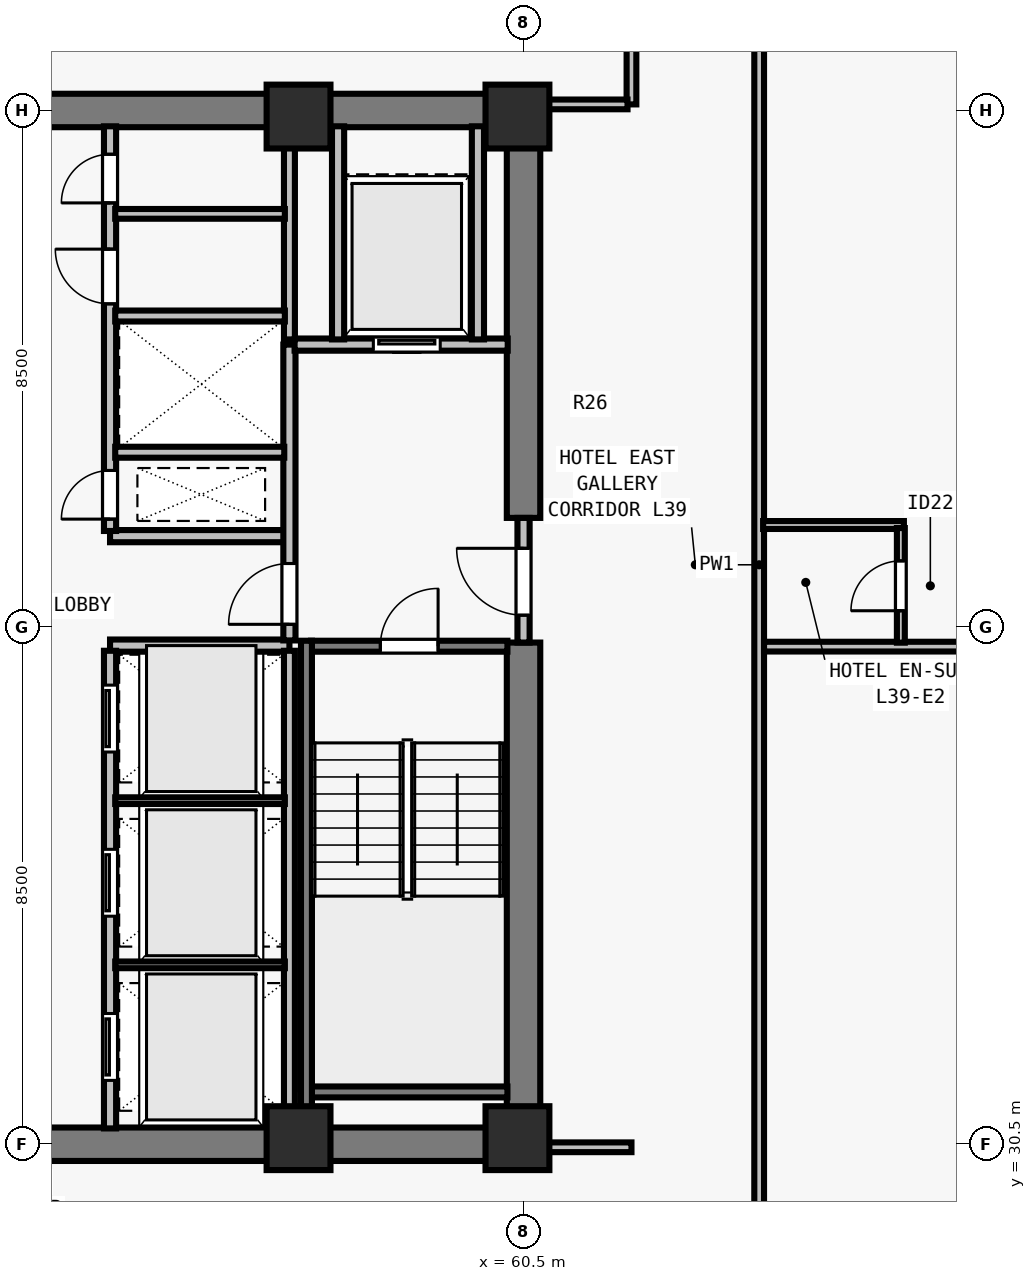
"""IFC4 building model, lengths in metres.
Left out: names, types, materials, properties, quantities, classifications, styles, units other than length and angle.
Written with IfcOpenShell. Run it as: python <this file> out.ifc"""

import sys

from ifc_helpers import new_model, si_unit, direction, frame, frame_2d, origin, origin_2d, place, context, subcontext, project, spatial, rectangle, extrude, element, fill, save


model = new_model("IFC4")
c1 = context("Model", 3, precision=1e-05, world=origin(), true_north=direction((0.0, 1.0)))
c2 = subcontext(c1, "Body", "Model", "MODEL_VIEW")
j1 = project(units=[si_unit("LENGTHUNIT", "METRE"), si_unit("PLANEANGLEUNIT", "RADIAN")], contexts=[c1])
p1 = place(None, origin())
s1 = spatial("IfcSite", under=j1, at=p1, CompositionType="ELEMENT")
p2 = place(p1, origin())
s2 = spatial("IfcBuilding", under=s1, at=p2, CompositionType="ELEMENT")
p3 = place(p2, frame((0.0, 0.0, 144.5)))
s3 = spatial("IfcBuildingStorey", under=s2, at=p3, CompositionType="ELEMENT", Elevation=144.5)
for number, where, z_axis, x_axis in (
    (1, (56.8, 30.6, 0.0), (0.0, 0.0, 1.0), (1.0, 0.0, 0.0)),
    (2, (60.4, 30.6, 0.0), (0.0, 0.0, 1.0), (1.0, 0.0, 0.0)),
    (3, (56.8, 47.4, 0.0), (0.0, 0.0, 1.0), (1.0, 0.0, 0.0)),
    (4, (60.4, 47.4, 0.0), (0.0, 0.0, 1.0), (1.0, 0.0, 0.0)),
):
    element("IfcColumn", number, at=place(p3, frame(where, z_axis=z_axis, x_axis=x_axis)), inside=s3, PredefinedType="COLUMN", context=c2, shape_type="SweptSolid", body=[
        extrude(rectangle(XDim=1.05, YDim=1.05, at=origin_2d()), origin(), (0.0, 0.0, 1.0), 3.5),
    ])
for number, where, z_axis, x_axis in (
    (5, (43.225, 30.5, 0.0), (0.0, 0.0, 1.0), (1.0, 0.0, 0.0)),
    (6, (43.225, 47.5, 0.0), (0.0, 0.0, 1.0), (1.0, 0.0, 0.0)),
):
    element("IfcWall", number, at=place(p3, frame(where, z_axis=z_axis, x_axis=x_axis)), inside=s3, PredefinedType="SHEAR", context=c2, shape_type="SweptSolid", body=[
        extrude(rectangle(XDim=17.55, YDim=0.55, at=frame_2d((8.775, 0.0))), origin(), (0.0, 0.0, 1.0), 3.28),
    ])
p4 = place(p3, frame((60.5, 30.765, 0.0), z_axis=(0.0, 0.0, 1.0), x_axis=(0.0, 1.0, 0.0)))
e7 = element("IfcWall", 7, at=p4, inside=s3, PredefinedType="SHEAR", context=c2, shape_type="SweptSolid", body=[
    extrude(rectangle(XDim=7.985, YDim=0.55, at=frame_2d((3.993, 0.0))), origin(), (0.0, 0.0, 1.0), 3.28),
])
p5 = place(p3, frame((60.5, 40.8, 0.0), z_axis=(0.0, 0.0, 1.0), x_axis=(0.0, 1.0, 0.0)))
e8 = element("IfcWall", 8, at=p5, inside=s3, PredefinedType="SHEAR", context=c2, shape_type="SweptSolid", body=[
    extrude(rectangle(XDim=6.435, YDim=0.55, at=frame_2d((3.218, 0.0))), origin(), (0.0, 0.0, 1.0), 3.28),
])
for number, where, z_axis, x_axis in (
    (9, (53.7, 38.7, 0.0), (0.0, 0.0, 1.0), (1.0, 0.0, 0.0)),
    (10, (53.7, 40.5, 0.0), (0.0, 0.0, 1.0), (1.0, 0.0, 0.0)),
):
    element("IfcWall", number, at=place(p3, frame(where, z_axis=z_axis, x_axis=x_axis)), inside=s3, PredefinedType="SOLIDWALL", context=c2, shape_type="SweptSolid", body=[
        extrude(rectangle(XDim=2.95, YDim=0.2, at=frame_2d((1.475, 0.0))), origin(), (0.0, 0.0, 1.0), 3.28),
    ])
p6 = place(p3, frame((53.7, 30.76, 0.0), z_axis=(0.0, 0.0, 1.0), x_axis=(0.0, 1.0, 0.0)))
e11 = element("IfcWall", 11, at=p6, inside=s3, PredefinedType="SOLIDWALL", context=c2, shape_type="SweptSolid", body=[
    extrude(rectangle(XDim=7.855, YDim=0.2, at=frame_2d((3.927, 0.0))), origin(), (0.0, 0.0, 1.0), 3.28),
])
p7 = place(p6, frame((0.79, 0.0, 0.0)))
e12 = element("IfcOpeningElement", 12, at=p7, cuts=e11, PredefinedType="OPENING", context=c2, shape_type="SweptSolid", body=[
    extrude(rectangle(XDim=1.1, YDim=2.2, at=frame_2d((0.55, 1.1))), frame((0.0, 0.11, 0.0), z_axis=(0.0, -1.0, 0.0), x_axis=(1.0, 0.0, 0.0)), (0.0, 0.0, 1.0), 0.22),
])
p8 = place(p6, frame((3.49, 0.0, 0.0)))
e13 = element("IfcOpeningElement", 13, at=p8, cuts=e11, PredefinedType="OPENING", context=c2, shape_type="SweptSolid", body=[
    extrude(rectangle(XDim=1.1, YDim=2.2, at=frame_2d((0.55, 1.1))), frame((0.0, 0.11, 0.0), z_axis=(0.0, -1.0, 0.0), x_axis=(1.0, 0.0, 0.0)), (0.0, 0.0, 1.0), 0.22),
])
p9 = place(p6, frame((6.19, 0.0, 0.0)))
e14 = element("IfcOpeningElement", 14, at=p9, cuts=e11, PredefinedType="OPENING", context=c2, shape_type="SweptSolid", body=[
    extrude(rectangle(XDim=1.1, YDim=2.2, at=frame_2d((0.55, 1.1))), frame((0.0, 0.11, 0.0), z_axis=(0.0, -1.0, 0.0), x_axis=(1.0, 0.0, 0.0)), (0.0, 0.0, 1.0), 0.22),
])
p10 = place(p3, frame((53.7, 40.585, 0.0), z_axis=(0.0, 0.0, 1.0), x_axis=(0.0, 1.0, 0.0)))
e15 = element("IfcWall", 15, at=p10, inside=s3, PredefinedType="SOLIDWALL", context=c2, shape_type="SweptSolid", body=[
    extrude(rectangle(XDim=6.655, YDim=0.2, at=frame_2d((3.328, 0.0))), origin(), (0.0, 0.0, 1.0), 3.28),
])
p11 = place(p10, frame((0.195, 0.0, 0.0)))
e16 = element("IfcOpeningElement", 16, at=p11, cuts=e15, PredefinedType="OPENING", context=c2, shape_type="SweptSolid", body=[
    extrude(rectangle(XDim=0.8, YDim=2.08, at=frame_2d((0.4, 1.04))), frame((0.0, 0.11, 0.0), z_axis=(0.0, -1.0, 0.0), x_axis=(1.0, 0.0, 0.0)), (0.0, 0.0, 1.0), 0.22),
])
p12 = place(p10, frame((3.735, 0.0, 0.0)))
e17 = element("IfcOpeningElement", 17, at=p12, cuts=e15, PredefinedType="OPENING", context=c2, shape_type="SweptSolid", body=[
    extrude(rectangle(XDim=0.9, YDim=2.12, at=frame_2d((0.45, 1.06))), frame((0.0, 0.11, 0.0), z_axis=(0.0, -1.0, 0.0), x_axis=(1.0, 0.0, 0.0)), (0.0, 0.0, 1.0), 0.22),
])
p13 = place(p10, frame((5.395, 0.0, 0.0)))
e18 = element("IfcOpeningElement", 18, at=p13, cuts=e15, PredefinedType="OPENING", context=c2, shape_type="SweptSolid", body=[
    extrude(rectangle(XDim=0.8, YDim=2.1, at=frame_2d((0.4, 1.05))), frame((0.0, 0.11, 0.0), z_axis=(0.0, -1.0, 0.0), x_axis=(1.0, 0.0, 0.0)), (0.0, 0.0, 1.0), 0.22),
])
p14 = place(p3, frame((60.5, 38.75, 0.0), z_axis=(0.0, 0.0, 1.0), x_axis=(0.0, 1.0, 0.0)))
e19 = element("IfcWall", 19, at=p14, inside=s3, PredefinedType="SOLIDWALL", context=c2, shape_type="SweptSolid", body=[
    extrude(rectangle(XDim=2.05, YDim=0.2, at=frame_2d((1.025, 0.0))), origin(), (0.0, 0.0, 1.0), 3.28),
])
p15 = place(p14, frame((0.45, 0.0, 0.0)))
e20 = element("IfcOpeningElement", 20, at=p15, cuts=e19, PredefinedType="OPENING", context=c2, shape_type="SweptSolid", body=[
    extrude(rectangle(XDim=1.1, YDim=2.15, at=frame_2d((0.55, 1.075))), frame((0.0, 0.11, 0.0), z_axis=(0.0, -1.0, 0.0), x_axis=(1.0, 0.0, 0.0)), (0.0, 0.0, 1.0), 0.22),
])
p16 = place(p3, frame((56.65, 38.785, 0.0), z_axis=(0.0, 0.0, 1.0), x_axis=(0.0, 1.0, 0.0)))
e21 = element("IfcWall", 21, at=p16, inside=s3, PredefinedType="SOLIDWALL", context=c2, shape_type="SweptSolid", body=[
    extrude(rectangle(XDim=4.865, YDim=0.2, at=frame_2d((2.433, 0.0))), origin(), (0.0, 0.0, 1.0), 3.28),
])
p17 = place(p16, frame((0.265, 0.0, 0.0)))
e22 = element("IfcOpeningElement", 22, at=p17, cuts=e21, PredefinedType="OPENING", context=c2, shape_type="SweptSolid", body=[
    extrude(rectangle(XDim=1.0, YDim=2.15, at=frame_2d((0.5, 1.075))), frame((0.0, 0.11, 0.0), z_axis=(0.0, -1.0, 0.0), x_axis=(1.0, 0.0, 0.0)), (0.0, 0.0, 1.0), 0.22),
])
p18 = place(p3, frame((56.735, 43.65, 0.0), z_axis=(0.0, 0.0, 1.0), x_axis=(1.0, 0.0, 0.0)))
e23 = element("IfcWall", 23, at=p18, inside=s3, PredefinedType="SOLIDWALL", context=c2, shape_type="SweptSolid", body=[
    extrude(rectangle(XDim=3.505, YDim=0.2, at=frame_2d((1.752, 0.0))), origin(), (0.0, 0.0, 1.0), 3.28),
])
p19 = place(p18, frame((1.295, 0.0, 0.0)))
e24 = element("IfcOpeningElement", 24, at=p19, cuts=e23, PredefinedType="OPENING", context=c2, shape_type="SweptSolid", body=[
    extrude(rectangle(XDim=1.1, YDim=2.2, at=frame_2d((0.55, 1.1))), frame((0.0, 0.11, 0.0), z_axis=(0.0, -1.0, 0.0), x_axis=(1.0, 0.0, 0.0)), (0.0, 0.0, 1.0), 0.22),
])
for number, where, z_axis, x_axis in (
    (25, (57.45, 43.735, 0.0), (0.0, 0.0, 1.0), (0.0, 1.0, 0.0)),
    (26, (59.75, 43.735, 0.0), (0.0, 0.0, 1.0), (0.0, 1.0, 0.0)),
):
    element("IfcWall", number, at=place(p3, frame(where, z_axis=z_axis, x_axis=x_axis)), inside=s3, PredefinedType="SOLIDWALL", context=c2, shape_type="SweptSolid", body=[
        extrude(rectangle(XDim=3.505, YDim=0.2, at=frame_2d((1.752, 0.0))), origin(), (0.0, 0.0, 1.0), 3.28),
    ])
p20 = place(p3, frame((56.65, 30.76, 0.0), z_axis=(0.0, 0.0, 1.0), x_axis=(0.0, 1.0, 0.0)))
e27 = element("IfcWall", 27, at=p20, inside=s3, PredefinedType="SOLIDWALL", context=c2, shape_type="SweptSolid", body=[
    extrude(rectangle(XDim=7.855, YDim=0.18, at=frame_2d((3.927, 0.0))), origin(), (0.0, 0.0, 1.0), 3.28),
])
for number, where, z_axis, x_axis in (
    (28, (53.785, 33.45, 0.0), (0.0, 0.0, 1.0), (1.0, 0.0, 0.0)),
    (29, (53.785, 36.15, 0.0), (0.0, 0.0, 1.0), (1.0, 0.0, 0.0)),
):
    element("IfcWall", number, at=place(p3, frame(where, z_axis=z_axis, x_axis=x_axis)), inside=s3, PredefinedType="PARTITIONING", context=c2, shape_type="SweptSolid", body=[
        extrude(rectangle(XDim=2.79, YDim=0.11, at=frame_2d((1.395, 0.0))), origin(), (0.0, 0.0, 1.0), 3.28),
    ])
p21 = place(p3, frame((56.65, 43.735, 0.0), z_axis=(0.0, 0.0, 1.0), x_axis=(0.0, 1.0, 0.0)))
e30 = element("IfcWall", 30, at=p21, inside=s3, PredefinedType="SOLIDWALL", context=c2, shape_type="SweptSolid", body=[
    extrude(rectangle(XDim=3.505, YDim=0.18, at=frame_2d((1.752, 0.0))), origin(), (0.0, 0.0, 1.0), 3.28),
])
p22 = place(p3, frame((53.785, 41.88, 0.0), z_axis=(0.0, 0.0, 1.0), x_axis=(1.0, 0.0, 0.0)))
e31 = element("IfcWall", 31, at=p22, inside=s3, PredefinedType="SOLIDWALL", context=c2, shape_type="SweptSolid", body=[
    extrude(rectangle(XDim=2.78, YDim=0.18, at=frame_2d((1.39, 0.0))), origin(), (0.0, 0.0, 1.0), 3.28),
])
p23 = place(p3, frame((53.785, 44.12, 0.0), z_axis=(0.0, 0.0, 1.0), x_axis=(1.0, 0.0, 0.0)))
e32 = element("IfcWall", 32, at=p23, inside=s3, PredefinedType="SOLIDWALL", context=c2, shape_type="SweptSolid", body=[
    extrude(rectangle(XDim=2.79, YDim=0.18, at=frame_2d((1.395, 0.0))), origin(), (0.0, 0.0, 1.0), 3.28),
])
p24 = place(p3, frame((53.785, 45.8, 0.0), z_axis=(0.0, 0.0, 1.0), x_axis=(1.0, 0.0, 0.0)))
e33 = element("IfcWall", 33, at=p24, inside=s3, PredefinedType="PARTITIONING", context=c2, shape_type="SweptSolid", body=[
    extrude(rectangle(XDim=2.79, YDim=0.16, at=frame_2d((1.395, 0.0))), origin(), (0.0, 0.0, 1.0), 3.28),
])
p25 = place(p3, frame((64.375, 15.325, 0.0), z_axis=(0.0, 0.0, 1.0), x_axis=(0.0, 1.0, 0.0)))
e34 = element("IfcWall", 34, at=p25, inside=s3, PredefinedType="PARTITIONING", context=c2, shape_type="SweptSolid", body=[
    extrude(rectangle(XDim=47.35, YDim=0.16, at=frame_2d((23.675, 0.0))), origin(), (0.0, 0.0, 1.0), 2.555),
])
p26 = place(p25, frame((12.547, 0.0, 0.0)))
e35 = element("IfcOpeningElement", 35, at=p26, cuts=e34, PredefinedType="OPENING", context=c2, shape_type="SweptSolid", body=[
    extrude(rectangle(XDim=0.96, YDim=2.15, at=frame_2d((0.48, 1.075))), frame((0.0, 0.09, 0.0), z_axis=(0.0, -1.0, 0.0), x_axis=(1.0, 0.0, 0.0)), (0.0, 0.0, 1.0), 0.18),
])
p27 = place(p25, frame((35.902, 0.0, 0.0)))
e36 = element("IfcOpeningElement", 36, at=p27, cuts=e34, PredefinedType="OPENING", context=c2, shape_type="SweptSolid", body=[
    extrude(rectangle(XDim=0.96, YDim=2.15, at=frame_2d((0.48, 1.075))), frame((0.0, 0.09, 0.0), z_axis=(0.0, -1.0, 0.0), x_axis=(1.0, 0.0, 0.0)), (0.0, 0.0, 1.0), 0.18),
])
p28 = place(p3, frame((62.275, 47.6, 0.0), z_axis=(0.0, 0.0, 1.0), x_axis=(0.0, 1.0, 0.0)))
e37 = element("IfcWall", 37, at=p28, inside=s3, PredefinedType="PARTITIONING", context=c2, shape_type="SweptSolid", body=[
    extrude(rectangle(XDim=15.075, YDim=0.16, at=frame_2d((7.538, 0.0))), origin(), (0.0, 0.0, 1.0), 2.555),
])
p29 = place(p3, frame((60.765, 30.45, 0.0), z_axis=(0.0, 0.0, 1.0), x_axis=(1.0, 0.0, 0.0)))
e38 = element("IfcWall", 38, at=p29, inside=s3, PredefinedType="PARTITIONING", context=c2, shape_type="SweptSolid", body=[
    extrude(rectangle(XDim=1.51, YDim=0.16, at=frame_2d((0.755, 0.0))), origin(), (0.0, 0.0, 1.0), 3.28),
])
p30 = place(p3, frame((60.765, 47.6, 0.0), z_axis=(0.0, 0.0, 1.0), x_axis=(1.0, 0.0, 0.0)))
e39 = element("IfcWall", 39, at=p30, inside=s3, PredefinedType="PARTITIONING", context=c2, shape_type="SweptSolid", body=[
    extrude(rectangle(XDim=1.445, YDim=0.16, at=frame_2d((0.723, 0.0))), origin(), (0.0, 0.0, 1.0), 3.28),
])
p31 = place(p3, frame((64.455, 38.683, 0.0), z_axis=(0.0, 0.0, 1.0), x_axis=(1.0, 0.0, 0.0)))
e40 = element("IfcWall", 40, at=p31, inside=s3, PredefinedType="PARTITIONING", context=c2, shape_type="SweptSolid", body=[
    extrude(rectangle(XDim=11.22, YDim=0.16, at=frame_2d((5.61, 0.0))), origin(), (0.0, 0.0, 1.0), 3.28),
])
p32 = place(p3, frame((64.44, 40.683, 0.0), z_axis=(0.0, 0.0, 1.0), x_axis=(1.0, 0.0, 0.0)))
e41 = element("IfcWall", 41, at=p32, inside=s3, PredefinedType="PLUMBINGWALL", context=c2, shape_type="SweptSolid", body=[
    extrude(rectangle(XDim=2.315, YDim=0.13, at=frame_2d((1.157, 0.0))), origin(), (0.0, 0.0, 1.0), 3.28),
])
p33 = place(p3, frame((66.705, 38.748, 0.0), z_axis=(0.0, 0.0, 1.0), x_axis=(0.0, 1.0, 0.0)))
e42 = element("IfcWall", 42, at=p33, inside=s3, PredefinedType="PLUMBINGWALL", context=c2, shape_type="SweptSolid", body=[
    extrude(rectangle(XDim=1.885, YDim=0.13, at=frame_2d((0.942, 0.0))), origin(), (0.0, 0.0, 1.0), 3.28),
])
p34 = place(p33, frame((0.525, 0.0, 0.0)))
e43 = element("IfcOpeningElement", 43, at=p34, cuts=e42, PredefinedType="OPENING", context=c2, shape_type="SweptSolid", body=[
    extrude(rectangle(XDim=0.82, YDim=2.1, at=frame_2d((0.41, 1.05))), frame((0.0, 0.075, 0.0), z_axis=(0.0, -1.0, 0.0), x_axis=(1.0, 0.0, 0.0)), (0.0, 0.0, 1.0), 0.15),
])
p35 = place(p3, frame((57.005, 38.69, 0.0), z_axis=(0.0, 0.0, 1.0), x_axis=(1.0, 0.0, 0.0)))
e44 = element("IfcWall", 44, at=p35, inside=s3, PredefinedType="SOLIDWALL", context=c2, shape_type="SweptSolid", body=[
    extrude(rectangle(XDim=3.23, YDim=0.18, at=frame_2d((1.615, 0.0))), origin(), (0.0, 0.0, 1.0), 3.28),
])
p36 = place(p35, frame((1.14, 0.0, 0.0)))
e45 = element("IfcOpeningElement", 45, at=p36, cuts=e44, PredefinedType="OPENING", context=c2, shape_type="SweptSolid", body=[
    extrude(rectangle(XDim=0.95, YDim=2.15, at=frame_2d((0.475, 1.075))), frame((0.0, 0.1, 0.0), z_axis=(0.0, -1.0, 0.0), x_axis=(1.0, 0.0, 0.0)), (0.0, 0.0, 1.0), 0.2),
])
p37 = place(p3, frame((57.005, 31.36, 0.0), z_axis=(0.0, 0.0, 1.0), x_axis=(1.0, 0.0, 0.0)))
e46 = element("IfcWall", 46, at=p37, inside=s3, PredefinedType="SOLIDWALL", context=c2, shape_type="SweptSolid", body=[
    extrude(rectangle(XDim=3.23, YDim=0.18, at=frame_2d((1.615, 0.0))), origin(), (0.0, 0.0, 1.0), 3.28),
])
p38 = place(p3, frame((56.93, 38.78, 0.0), z_axis=(0.0, 0.0, 1.0), x_axis=(0.0, -1.0, 0.0)))
e47 = element("IfcWall", 47, at=p38, inside=s3, PredefinedType="SOLIDWALL", context=c2, shape_type="SweptSolid", body=[
    extrude(rectangle(XDim=8.017, YDim=0.18, at=frame_2d((4.009, 0.0))), origin(), (0.0, 0.0, 1.0), 3.28),
])
p39 = place(p15, origin())
e48 = element("IfcDoor", 48, at=p39, inside=s3, OperationType="SINGLE_SWING_RIGHT", PredefinedType="DOOR", context=c2, shape_type="SweptSolid", body=[
    extrude(rectangle(XDim=1.1, YDim=2.15, at=frame_2d((0.55, 1.075))), frame((0.0, 0.025, 0.0), z_axis=(0.0, -1.0, 0.0), x_axis=(1.0, 0.0, 0.0)), (0.0, 0.0, 1.0), 0.05),
])
fill(e20, e48)
p40 = place(p17, origin())
e49 = element("IfcDoor", 49, at=p40, inside=s3, OperationType="SINGLE_SWING_LEFT", PredefinedType="DOOR", context=c2, shape_type="SweptSolid", body=[
    extrude(rectangle(XDim=1.0, YDim=2.15, at=frame_2d((0.5, 1.075))), frame((0.0, 0.025, 0.0), z_axis=(0.0, -1.0, 0.0), x_axis=(1.0, 0.0, 0.0)), (0.0, 0.0, 1.0), 0.05),
])
fill(e22, e49)
p41 = place(p19, origin())
e50 = element("IfcDoor", 50, at=p41, inside=s3, OperationType="SLIDING_TO_LEFT", PredefinedType="DOOR", context=c2, shape_type="SweptSolid", body=[
    extrude(rectangle(XDim=1.1, YDim=2.2, at=frame_2d((0.55, 1.1))), frame((0.0, 0.025, 0.0), z_axis=(0.0, -1.0, 0.0), x_axis=(1.0, 0.0, 0.0)), (0.0, 0.0, 1.0), 0.05),
])
fill(e24, e50)
p42 = place(p7, origin())
e51 = element("IfcDoor", 51, at=p42, inside=s3, OperationType="SLIDING_TO_LEFT", PredefinedType="DOOR", context=c2, shape_type="SweptSolid", body=[
    extrude(rectangle(XDim=1.1, YDim=2.2, at=frame_2d((0.55, 1.1))), frame((0.0, 0.025, 0.0), z_axis=(0.0, -1.0, 0.0), x_axis=(1.0, 0.0, 0.0)), (0.0, 0.0, 1.0), 0.05),
])
fill(e12, e51)
p43 = place(p8, origin())
e52 = element("IfcDoor", 52, at=p43, inside=s3, OperationType="SLIDING_TO_LEFT", PredefinedType="DOOR", context=c2, shape_type="SweptSolid", body=[
    extrude(rectangle(XDim=1.1, YDim=2.2, at=frame_2d((0.55, 1.1))), frame((0.0, 0.025, 0.0), z_axis=(0.0, -1.0, 0.0), x_axis=(1.0, 0.0, 0.0)), (0.0, 0.0, 1.0), 0.05),
])
fill(e13, e52)
p44 = place(p9, origin())
e53 = element("IfcDoor", 53, at=p44, inside=s3, OperationType="SLIDING_TO_LEFT", PredefinedType="DOOR", context=c2, shape_type="SweptSolid", body=[
    extrude(rectangle(XDim=1.1, YDim=2.2, at=frame_2d((0.55, 1.1))), frame((0.0, 0.025, 0.0), z_axis=(0.0, -1.0, 0.0), x_axis=(1.0, 0.0, 0.0)), (0.0, 0.0, 1.0), 0.05),
])
fill(e14, e53)
p45 = place(p11, origin())
e54 = element("IfcDoor", 54, at=p45, inside=s3, OperationType="SINGLE_SWING_LEFT", PredefinedType="DOOR", context=c2, shape_type="SweptSolid", body=[
    extrude(rectangle(XDim=0.8, YDim=2.08, at=frame_2d((0.4, 1.04))), frame((0.0, 0.025, 0.0), z_axis=(0.0, -1.0, 0.0), x_axis=(1.0, 0.0, 0.0)), (0.0, 0.0, 1.0), 0.05),
])
fill(e16, e54)
p46 = place(p12, origin())
e55 = element("IfcDoor", 55, at=p46, inside=s3, OperationType="SINGLE_SWING_RIGHT", PredefinedType="DOOR", context=c2, shape_type="SweptSolid", body=[
    extrude(rectangle(XDim=0.9, YDim=2.12, at=frame_2d((0.45, 1.06))), frame((0.0, 0.025, 0.0), z_axis=(0.0, -1.0, 0.0), x_axis=(1.0, 0.0, 0.0)), (0.0, 0.0, 1.0), 0.05),
])
fill(e17, e55)
p47 = place(p13, origin())
e56 = element("IfcDoor", 56, at=p47, inside=s3, OperationType="SINGLE_SWING_LEFT", PredefinedType="DOOR", context=c2, shape_type="SweptSolid", body=[
    extrude(rectangle(XDim=0.8, YDim=2.1, at=frame_2d((0.4, 1.05))), frame((0.0, 0.025, 0.0), z_axis=(0.0, -1.0, 0.0), x_axis=(1.0, 0.0, 0.0)), (0.0, 0.0, 1.0), 0.05),
])
fill(e18, e56)
p48 = place(p34, origin())
e57 = element("IfcDoor", 57, at=p48, inside=s3, OperationType="SINGLE_SWING_LEFT", PredefinedType="DOOR", context=c2, shape_type="SweptSolid", body=[
    extrude(rectangle(XDim=0.82, YDim=2.1, at=frame_2d((0.41, 1.05))), frame((0.0, 0.025, 0.0), z_axis=(0.0, -1.0, 0.0), x_axis=(1.0, 0.0, 0.0)), (0.0, 0.0, 1.0), 0.05),
])
fill(e43, e57)
p49 = place(p36, origin())
e58 = element("IfcDoor", 58, at=p49, inside=s3, OperationType="SINGLE_SWING_RIGHT", PredefinedType="DOOR", context=c2, shape_type="SweptSolid", body=[
    extrude(rectangle(XDim=0.95, YDim=2.15, at=frame_2d((0.475, 1.075))), frame((0.0, 0.025, 0.0), z_axis=(0.0, -1.0, 0.0), x_axis=(1.0, 0.0, 0.0)), (0.0, 0.0, 1.0), 0.05),
])
fill(e45, e58)
save(model, sys.argv[1])
